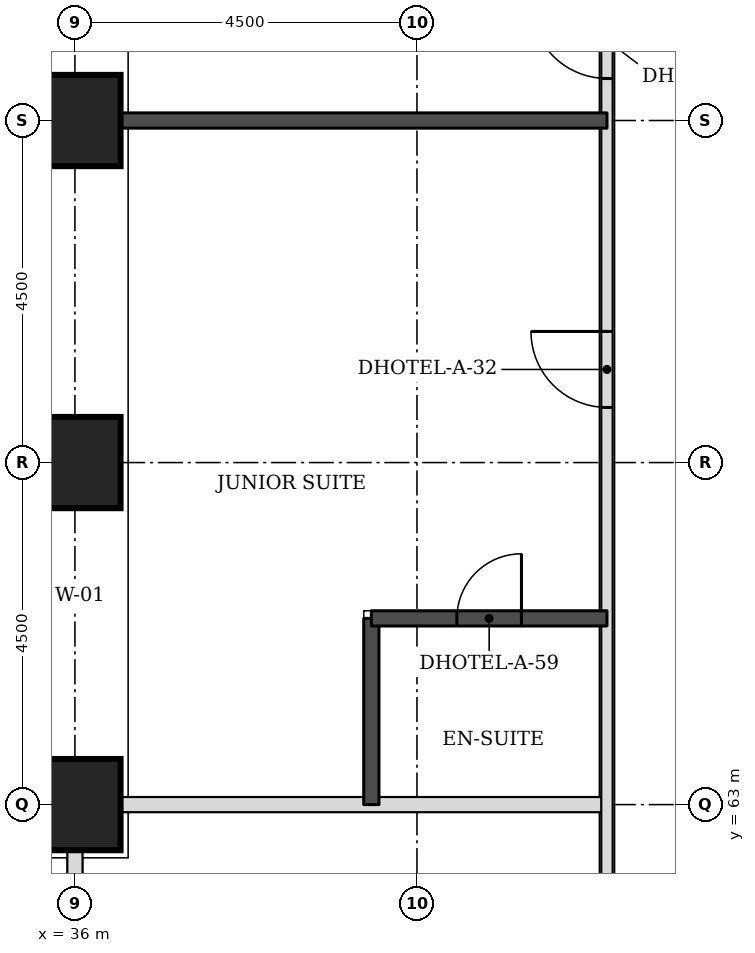
"""IFC4 building model, lengths in metres.
Left out: names, types, materials, properties, quantities, classifications, styles, units other than length and angle.
Written with IfcOpenShell. Run it as: python <this file> out.ifc"""

import sys

from ifc_helpers import new_model, si_unit, direction, frame, frame_2d, origin, origin_2d, place, context, subcontext, project, spatial, rectangle, extrude, element, fill, save


model = new_model("IFC4")
c1 = context("Model", 3, precision=1e-05, world=origin(), true_north=direction((0.0, 1.0)))
c2 = subcontext(c1, "Body", "Model", "MODEL_VIEW")
j1 = project(units=[si_unit("LENGTHUNIT", "METRE"), si_unit("PLANEANGLEUNIT", "RADIAN")], contexts=[c1])
p1 = place(None, origin())
s1 = spatial("IfcSite", under=j1, at=p1, CompositionType="ELEMENT")
p2 = place(p1, origin())
s2 = spatial("IfcBuilding", under=s1, at=p2, CompositionType="ELEMENT")
p3 = place(p2, frame((0.0, 0.0, 49.5)))
s3 = spatial("IfcBuildingStorey", under=s2, at=p3, CompositionType="ELEMENT", Elevation=49.5)
for number, where, z_axis, x_axis in (
    (1, (36.0, 63.0, 0.0), (0.0, 0.0, 1.0), (1.0, 0.0, 0.0)),
    (2, (36.0, 67.5, 0.0), (0.0, 0.0, 1.0), (1.0, 0.0, 0.0)),
    (3, (36.0, 72.0, 0.0), (0.0, 0.0, 1.0), (1.0, 0.0, 0.0)),
):
    element("IfcColumn", number, at=place(p3, frame(where, z_axis=z_axis, x_axis=x_axis)), inside=s3, PredefinedType="COLUMN", context=c2, shape_type="SweptSolid", body=[
        extrude(rectangle(XDim=1.2, YDim=1.2, at=origin_2d()), origin(), (0.0, 0.0, 1.0), 3.3),
    ])
p4 = place(p3, frame((36.0, 56.0, 0.0), z_axis=(0.0, 0.0, 1.0), x_axis=(0.0, 1.0, 0.0)))
e4 = element("IfcWall", 4, at=p4, inside=s3, PredefinedType="PARTITIONING", context=c2, shape_type="SweptSolid", body=[
    extrude(rectangle(XDim=6.4, YDim=0.2, at=frame_2d((3.2, 0.0))), origin(), (0.0, 0.0, 1.0), 2.33),
])
p5 = place(p3, frame((36.6, 63.0, 0.0), z_axis=(0.0, 0.0, 1.0), x_axis=(1.0, 0.0, 0.0)))
e5 = element("IfcWall", 5, at=p5, inside=s3, PredefinedType="PARTITIONING", context=c2, shape_type="SweptSolid", body=[
    extrude(rectangle(XDim=6.4, YDim=0.2, at=frame_2d((3.2, 0.0))), origin(), (0.0, 0.0, 1.0), 3.08),
])
p6 = place(p3, frame((43.0, 56.0, 0.0), z_axis=(0.0, 0.0, 1.0), x_axis=(0.0, 1.0, 0.0)))
e6 = element("IfcWall", 6, at=p6, inside=s3, PredefinedType="PARTITIONING", context=c2, shape_type="SweptSolid", body=[
    extrude(rectangle(XDim=18.0, YDim=0.15, at=frame_2d((9.0, 0.0))), origin(), (0.0, 0.0, 1.0), 3.08),
])
p7 = place(p6, frame((12.225, 0.0, 0.0)))
e7 = element("IfcOpeningElement", 7, at=p7, cuts=e6, PredefinedType="OPENING", context=c2, shape_type="SweptSolid", body=[
    extrude(rectangle(XDim=1.0, YDim=2.1, at=frame_2d((0.5, 1.05))), frame((0.0, 0.085, 0.0), z_axis=(0.0, -1.0, 0.0), x_axis=(1.0, 0.0, 0.0)), (0.0, 0.0, 1.0), 0.17),
])
p8 = place(p6, frame((16.553, 0.0, 0.0)))
e8 = element("IfcOpeningElement", 8, at=p8, cuts=e6, PredefinedType="OPENING", context=c2, shape_type="SweptSolid", body=[
    extrude(rectangle(XDim=1.0, YDim=2.1, at=frame_2d((0.5, 1.05))), frame((0.0, 0.085, 0.0), z_axis=(0.0, -1.0, 0.0), x_axis=(1.0, 0.0, 0.0)), (0.0, 0.0, 1.0), 0.17),
])
p9 = place(p6, frame((3.05, 0.0, 0.0)))
e9 = element("IfcOpeningElement", 9, at=p9, cuts=e6, PredefinedType="OPENING", context=c2, shape_type="SweptSolid", body=[
    extrude(rectangle(XDim=0.9, YDim=2.1, at=frame_2d((0.45, 1.05))), frame((0.0, 0.085, 0.0), z_axis=(0.0, -1.0, 0.0), x_axis=(1.0, 0.0, 0.0)), (0.0, 0.0, 1.0), 0.17),
])
p10 = place(p3, frame((39.9, 63.0, 0.0), z_axis=(0.0, 0.0, 1.0), x_axis=(0.0, 1.0, 0.0)))
e10 = element("IfcWall", 10, at=p10, inside=s3, PredefinedType="SOLIDWALL", context=c2, shape_type="SweptSolid", body=[
    extrude(rectangle(XDim=2.45, YDim=0.2, at=frame_2d((1.225, 0.0))), origin(), (0.0, 0.0, 1.0), 3.08),
])
p11 = place(p3, frame((39.9, 65.45, 0.0), z_axis=(0.0, 0.0, 1.0), x_axis=(1.0, 0.0, 0.0)))
e11 = element("IfcWall", 11, at=p11, inside=s3, PredefinedType="SOLIDWALL", context=c2, shape_type="SweptSolid", body=[
    extrude(rectangle(XDim=3.1, YDim=0.2, at=frame_2d((1.55, 0.0))), origin(), (0.0, 0.0, 1.0), 3.08),
])
p12 = place(p11, frame((1.125, 0.0, 0.0)))
e12 = element("IfcOpeningElement", 12, at=p12, cuts=e11, PredefinedType="OPENING", context=c2, shape_type="SweptSolid", body=[
    extrude(rectangle(XDim=0.85, YDim=2.1, at=frame_2d((0.425, 1.05))), frame((0.0, 0.11, 0.0), z_axis=(0.0, -1.0, 0.0), x_axis=(1.0, 0.0, 0.0)), (0.0, 0.0, 1.0), 0.22),
])
p13 = place(p3, frame((36.6, 72.0, 0.0), z_axis=(0.0, 0.0, 1.0), x_axis=(1.0, 0.0, 0.0)))
e13 = element("IfcWall", 13, at=p13, inside=s3, PredefinedType="SOLIDWALL", context=c2, shape_type="SweptSolid", body=[
    extrude(rectangle(XDim=6.4, YDim=0.2, at=frame_2d((3.2, 0.0))), origin(), (0.0, 0.0, 1.0), 3.08),
])
p14 = place(p7, origin())
e14 = element("IfcDoor", 14, at=p14, inside=s3, OperationType="SINGLE_SWING_RIGHT", PredefinedType="DOOR", context=c2, shape_type="SweptSolid", body=[
    extrude(rectangle(XDim=1.0, YDim=2.1, at=frame_2d((0.5, 1.05))), frame((0.0, 0.025, 0.0), z_axis=(0.0, -1.0, 0.0), x_axis=(1.0, 0.0, 0.0)), (0.0, 0.0, 1.0), 0.05),
])
fill(e7, e14)
p15 = place(p12, origin())
e15 = element("IfcDoor", 15, at=p15, inside=s3, OperationType="SINGLE_SWING_RIGHT", PredefinedType="DOOR", context=c2, shape_type="SweptSolid", body=[
    extrude(rectangle(XDim=0.85, YDim=2.1, at=frame_2d((0.425, 1.05))), frame((0.0, 0.025, 0.0), z_axis=(0.0, -1.0, 0.0), x_axis=(1.0, 0.0, 0.0)), (0.0, 0.0, 1.0), 0.05),
])
fill(e12, e15)
p16 = place(p8, origin())
e16 = element("IfcDoor", 16, at=p16, inside=s3, OperationType="SINGLE_SWING_RIGHT", PredefinedType="DOOR", context=c2, shape_type="SweptSolid", body=[
    extrude(rectangle(XDim=1.0, YDim=2.1, at=frame_2d((0.5, 1.05))), frame((0.0, 0.025, 0.0), z_axis=(0.0, -1.0, 0.0), x_axis=(1.0, 0.0, 0.0)), (0.0, 0.0, 1.0), 0.05),
])
fill(e8, e16)
save(model, sys.argv[1])
